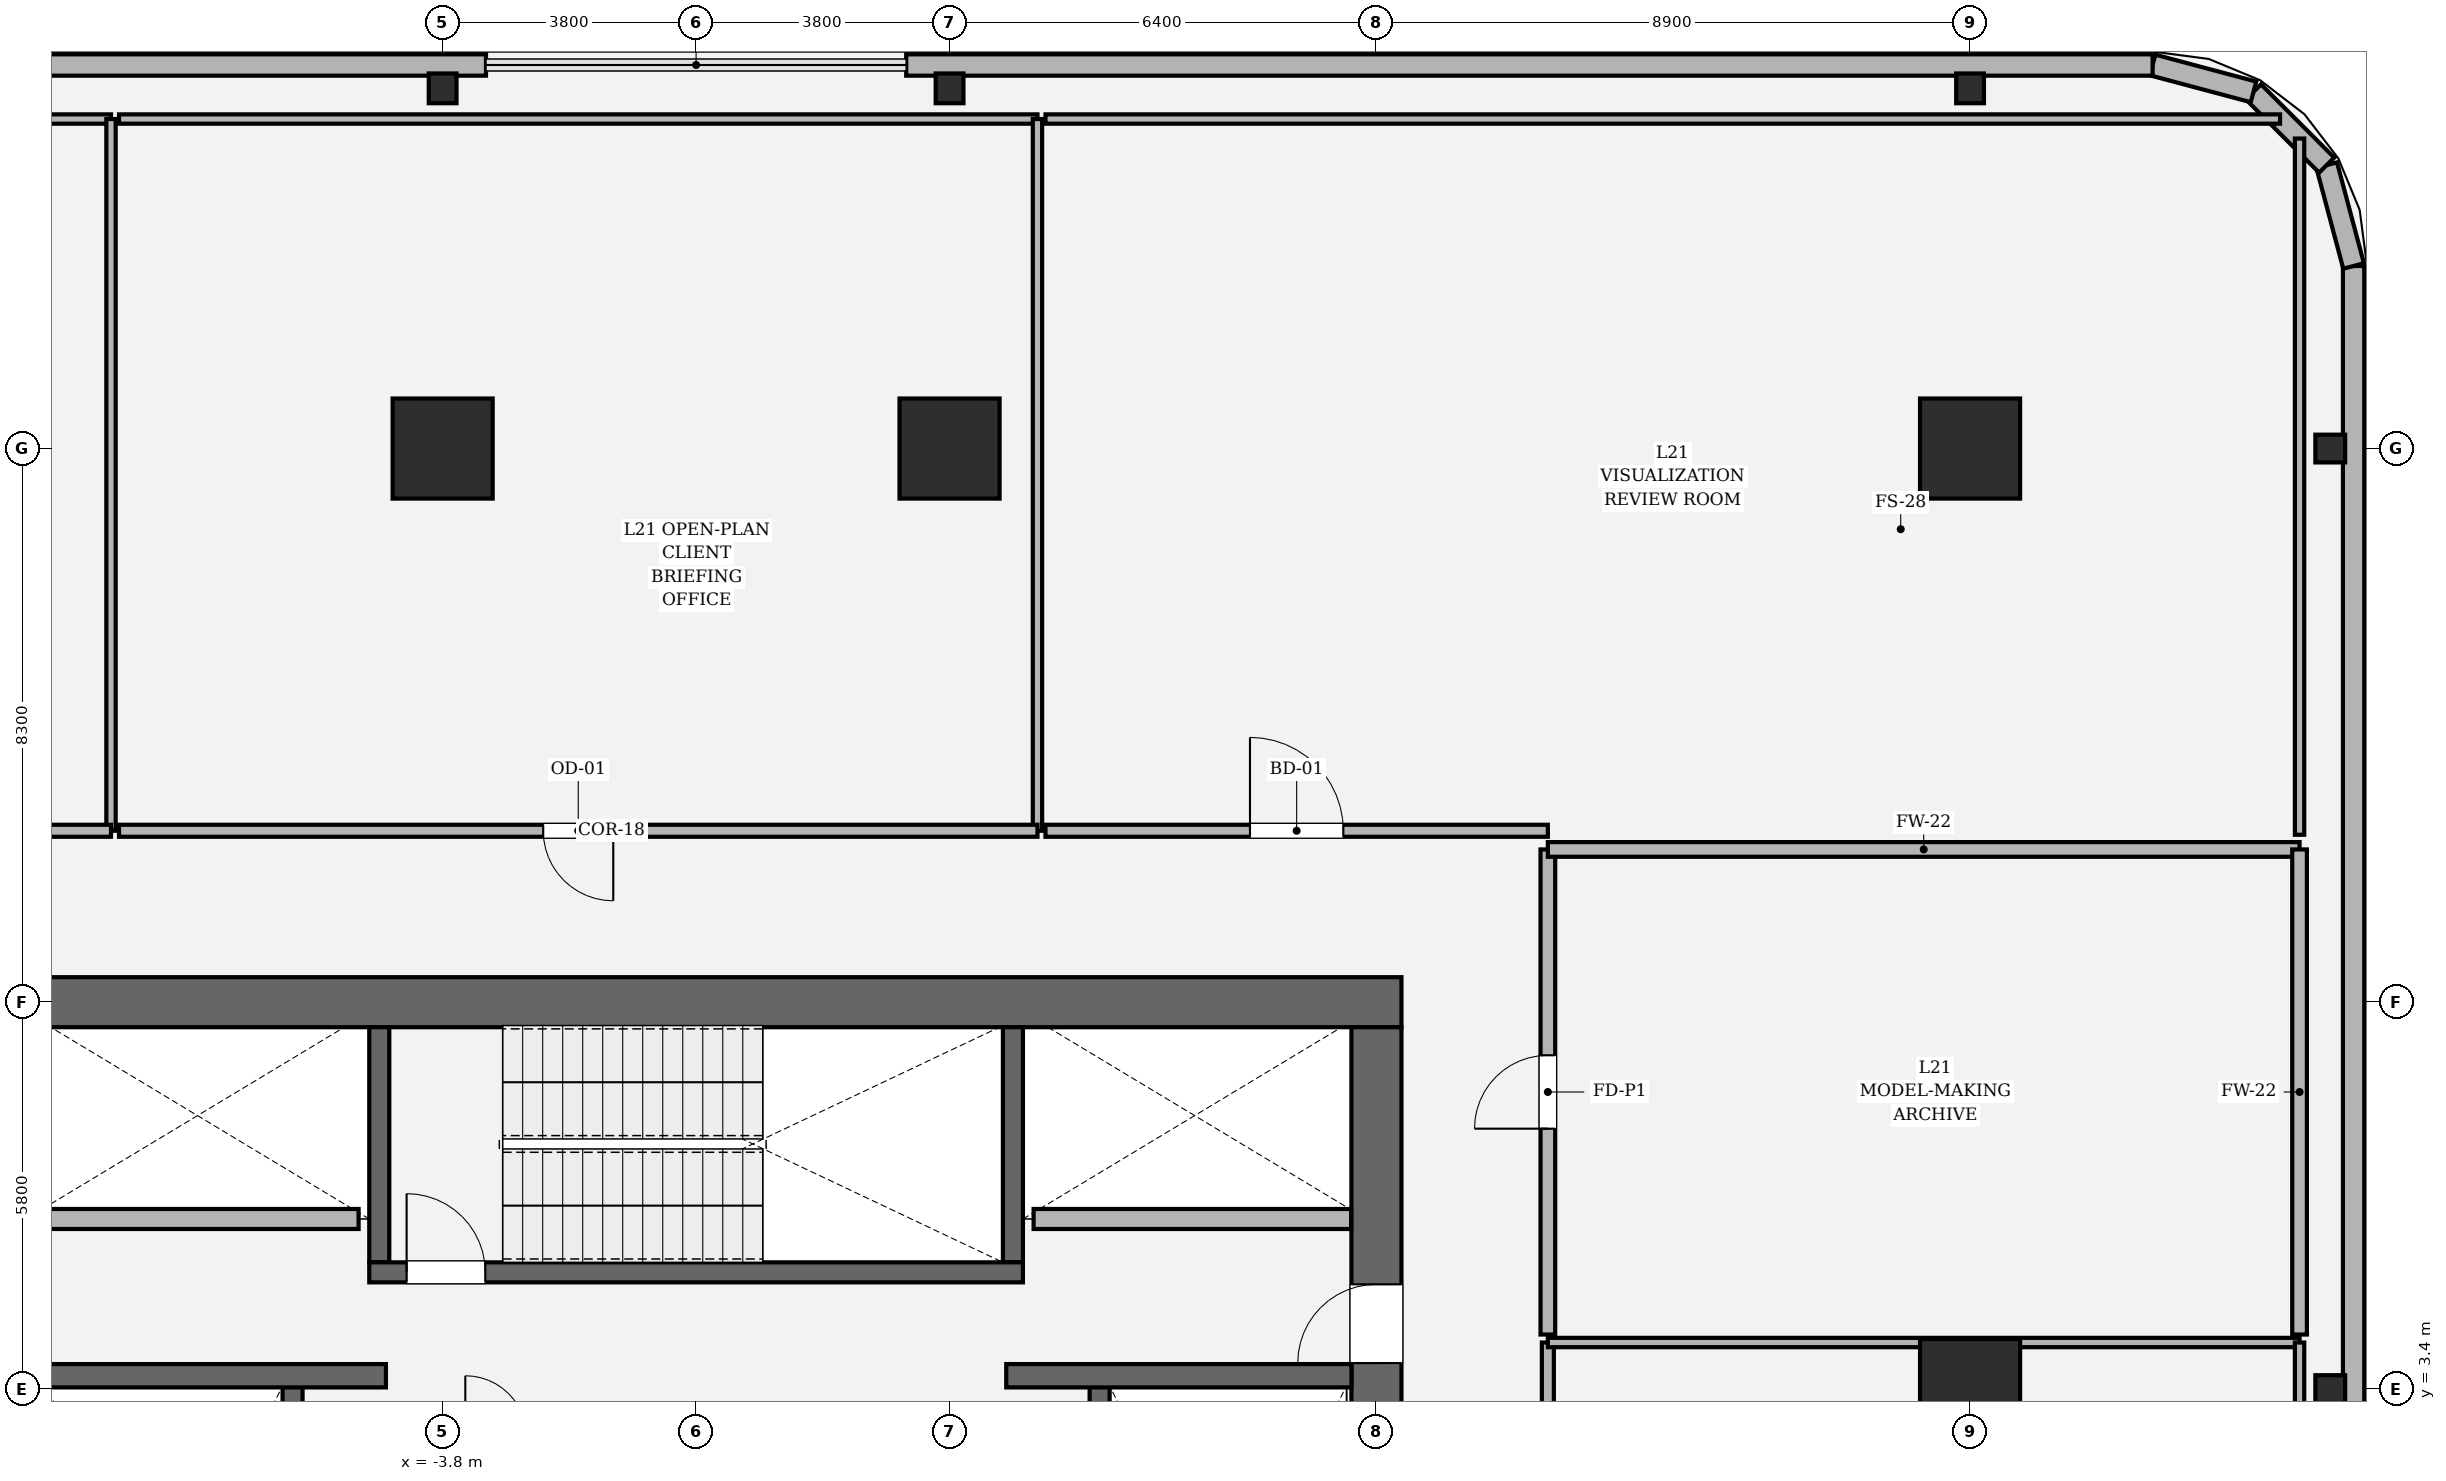
"""IFC4 building model, lengths in metres.
Left out: names, types, materials, properties, quantities, classifications, styles, units other than length and angle.
Written with IfcOpenShell. Run it as: python <this file> out.ifc"""

import sys

from ifc_helpers import new_model, si_unit, direction, frame, frame_2d, origin, origin_2d, place, context, subcontext, project, spatial, rectangle, hollow_rectangle, i_section, extrude, element, fill, save


model = new_model("IFC4")
c1 = context("Model", 3, precision=1e-05, world=origin(), true_north=direction((0.0, 1.0)))
c2 = subcontext(c1, "Body", "Model", "MODEL_VIEW")
j1 = project(units=[si_unit("LENGTHUNIT", "METRE"), si_unit("PLANEANGLEUNIT", "RADIAN")], contexts=[c1])
p1 = place(None, origin())
s1 = spatial("IfcSite", under=j1, at=p1, CompositionType="ELEMENT")
p2 = place(p1, origin())
s2 = spatial("IfcBuilding", under=s1, at=p2, CompositionType="ELEMENT")
p3 = place(p2, frame((0.0, 0.0, 93.0)))
s3 = spatial("IfcBuildingStorey", under=s2, at=p3, CompositionType="ELEMENT", Elevation=93.0)
p4 = place(p3, frame((-10.575, 9.2, 0.0), z_axis=(0.0, 0.0, 1.0), x_axis=(1.0, 0.0, 0.0)))
e1 = element("IfcWall", 1, at=p4, inside=s3, PredefinedType="SHEAR", context=c2, shape_type="SweptSolid", body=[
    extrude(rectangle(XDim=21.15, YDim=0.75, at=frame_2d((10.575, 0.0))), origin(), (0.0, 0.0, 1.0), 4.05),
])
p5 = place(p3, frame((10.2, 8.825, 0.0), z_axis=(0.0, 0.0, 1.0), x_axis=(0.0, -1.0, 0.0)))
e2 = element("IfcWall", 2, at=p5, inside=s3, PredefinedType="SHEAR", context=c2, shape_type="SweptSolid", body=[
    extrude(rectangle(XDim=17.65, YDim=0.75, at=frame_2d((8.825, 0.0))), origin(), (0.0, 0.0, 1.0), 4.05),
])
p6 = place(p5, frame((3.855, 0.0, 0.0)))
e3 = element("IfcOpeningElement", 3, at=p6, cuts=e2, PredefinedType="OPENING", context=c2, shape_type="SweptSolid", body=[
    extrude(rectangle(XDim=1.18, YDim=2.2, at=frame_2d((0.59, 1.1))), frame((0.0, 0.385, 0.0), z_axis=(0.0, -1.0, 0.0), x_axis=(1.0, 0.0, 0.0)), (0.0, 0.0, 1.0), 0.77),
])
for number, where, z_axis, x_axis in (
    (4, (-6.05, -5.5, 0.0), (0.0, 0.0, 1.0), (0.0, 1.0, 0.0)),
    (5, (6.05, 3.45, 0.0), (0.0, 0.0, 1.0), (0.0, -1.0, 0.0)),
):
    element("IfcWall", number, at=place(p3, frame(where, z_axis=z_axis, x_axis=x_axis)), inside=s3, PredefinedType="SOLIDWALL", context=c2, shape_type="SweptSolid", body=[
        extrude(rectangle(XDim=8.95, YDim=0.3, at=frame_2d((4.475, 0.0))), origin(), (0.0, 0.0, 1.0), 4.05),
    ])
for number, where, z_axis, x_axis in (
    (6, (-4.75, 5.3, 0.0), (0.0, 0.0, 1.0), (0.0, 1.0, 0.0)),
    (7, (4.75, 8.825, 0.0), (0.0, 0.0, 1.0), (0.0, -1.0, 0.0)),
):
    element("IfcWall", number, at=place(p3, frame(where, z_axis=z_axis, x_axis=x_axis)), inside=s3, PredefinedType="SOLIDWALL", context=c2, shape_type="SweptSolid", body=[
        extrude(rectangle(XDim=3.525, YDim=0.3, at=frame_2d((1.762, 0.0))), origin(), (0.0, 0.0, 1.0), 4.05),
    ])
p7 = place(p3, frame((-4.9, 5.15, 0.0), z_axis=(0.0, 0.0, 1.0), x_axis=(1.0, 0.0, 0.0)))
e8 = element("IfcWall", 8, at=p7, inside=s3, PredefinedType="SOLIDWALL", context=c2, shape_type="SweptSolid", body=[
    extrude(rectangle(XDim=9.8, YDim=0.3, at=frame_2d((4.9, 0.0))), origin(), (0.0, 0.0, 1.0), 4.05),
])
p8 = place(p7, frame((0.56, 0.0, 0.0)))
e9 = element("IfcOpeningElement", 9, at=p8, cuts=e8, PredefinedType="OPENING", context=c2, shape_type="SweptSolid", body=[
    extrude(rectangle(XDim=1.18, YDim=2.2, at=frame_2d((0.59, 1.1))), frame((0.0, 0.16, 0.0), z_axis=(0.0, -1.0, 0.0), x_axis=(1.0, 0.0, 0.0)), (0.0, 0.0, 1.0), 0.32),
])
for number, where, z_axis, x_axis in (
    (10, (-9.825, 3.6, 0.0), (0.0, 0.0, 1.0), (1.0, 0.0, 0.0)),
    (11, (4.65, 3.6, 0.0), (0.0, 0.0, 1.0), (1.0, 0.0, 0.0)),
):
    element("IfcWall", number, at=place(p3, frame(where, z_axis=z_axis, x_axis=x_axis)), inside=s3, PredefinedType="SOLIDWALL", context=c2, shape_type="SweptSolid", body=[
        extrude(rectangle(XDim=5.175, YDim=0.35, at=frame_2d((2.587, 0.0))), origin(), (0.0, 0.0, 1.0), 4.05),
    ])
for number, where, z_axis, x_axis in (
    (12, (19.1, 3.4, 0.0), (0.0, 0.0, 1.0), (1.0, 0.0, 0.0)),
    (13, (19.1, 17.5, 0.0), (0.0, 0.0, 1.0), (1.0, 0.0, 0.0)),
    (14, (3.8, 17.5, 0.0), (0.0, 0.0, 1.0), (1.0, 0.0, 0.0)),
    (15, (-3.8, 17.5, 0.0), (0.0, 0.0, 1.0), (1.0, 0.0, 0.0)),
):
    element("IfcColumn", number, at=place(p3, frame(where, z_axis=z_axis, x_axis=x_axis)), inside=s3, PredefinedType="COLUMN", context=c2, shape_type="SweptSolid", body=[
        extrude(hollow_rectangle(XDim=1.5, YDim=1.5, WallThickness=0.045, at=origin_2d()), origin(), (0.0, 0.0, 1.0), 4.05),
    ])
for number, where, z_axis, x_axis in (
    (16, (-3.8, 22.9, 0.0), (0.0, 0.0, 1.0), (1.0, 0.0, 0.0)),
    (17, (3.8, 22.9, 0.0), (0.0, 0.0, 1.0), (1.0, 0.0, 0.0)),
    (18, (19.1, 22.9, 0.0), (0.0, 0.0, 1.0), (1.0, 0.0, 0.0)),
    (19, (24.5, 3.4, 0.0), (0.0, 0.0, 1.0), (0.0, 1.0, 0.0)),
    (20, (24.5, 17.5, 0.0), (0.0, 0.0, 1.0), (0.0, 1.0, 0.0)),
):
    element("IfcColumn", number, at=place(p3, frame(where, z_axis=z_axis, x_axis=x_axis)), inside=s3, PredefinedType="COLUMN", context=c2, shape_type="SweptSolid", body=[
        extrude(i_section(OverallWidth=0.416, OverallDepth=0.446, WebThickness=0.039, FlangeThickness=0.062, FilletRadius=0.018, at=origin_2d()), origin(), (0.0, 0.0, 1.0), 4.048),
    ])
p9 = place(p3, frame((24.85, 2.75, 0.0), z_axis=(0.0, 0.0, 1.0), x_axis=(0.0, 1.0, 0.0)))
e21 = element("IfcWall", 21, at=p9, inside=s3, PredefinedType="SOLIDWALL", context=c2, shape_type="SweptSolid", body=[
    extrude(rectangle(XDim=17.487, YDim=0.32, at=frame_2d((8.743, 0.0))), origin(), (0.0, 0.0, 1.0), 2.524),
])
p10 = place(p3, frame((24.85, 20.237, 0.0), z_axis=(0.0, 0.0, 1.0), x_axis=(-0.257847112249, 0.966185730957, 0.0)))
e22 = element("IfcWall", 22, at=p10, inside=s3, PredefinedType="SOLIDWALL", context=c2, shape_type="SweptSolid", body=[
    extrude(rectangle(XDim=1.565, YDim=0.32, at=frame_2d((0.783, 0.0))), origin(), (0.0, 0.0, 1.0), 3.81),
])
p11 = place(p3, frame((24.447, 21.749, 0.0), z_axis=(0.0, 0.0, 1.0), x_axis=(-0.707028130747, 0.707185422879, 0.0)))
e23 = element("IfcWall", 23, at=p11, inside=s3, PredefinedType="SOLIDWALL", context=c2, shape_type="SweptSolid", body=[
    extrude(rectangle(XDim=1.552, YDim=0.32, at=frame_2d((0.776, 0.0))), origin(), (0.0, 0.0, 1.0), 3.81),
])
p12 = place(p3, frame((23.349, 22.847, 0.0), z_axis=(0.0, 0.0, 1.0), x_axis=(-0.966224582397, 0.257701486942, 0.0)))
e24 = element("IfcWall", 24, at=p12, inside=s3, PredefinedType="SOLIDWALL", context=c2, shape_type="SweptSolid", body=[
    extrude(rectangle(XDim=1.565, YDim=0.32, at=frame_2d((0.783, 0.0))), origin(), (0.0, 0.0, 1.0), 3.81),
])
p13 = place(p3, frame((21.837, 23.25, 0.0), z_axis=(0.0, 0.0, 1.0), x_axis=(-1.0, 0.0, 0.0)))
e25 = element("IfcWall", 25, at=p13, inside=s3, PredefinedType="SOLIDWALL", context=c2, shape_type="SweptSolid", body=[
    extrude(rectangle(XDim=18.687, YDim=0.32, at=frame_2d((9.344, 0.0))), origin(), (0.0, 0.0, 1.0), 2.524),
])
p14 = place(p3, frame((-3.15, 23.25, 0.0), z_axis=(0.0, 0.0, 1.0), x_axis=(-1.0, 0.0, 0.0)))
e26 = element("IfcWall", 26, at=p14, inside=s3, PredefinedType="SOLIDWALL", context=c2, shape_type="SweptSolid", body=[
    extrude(rectangle(XDim=13.887, YDim=0.32, at=frame_2d((6.943, 0.0))), origin(), (0.0, 0.0, 1.0), 2.524),
])
for number, where, z_axis, x_axis in (
    (27, (-9.82, 5.95, 0.0), (0.0, 0.0, 1.0), (1.0, 0.0, 0.0)),
    (28, (5.06, 5.95, 0.0), (0.0, 0.0, 1.0), (1.0, 0.0, 0.0)),
):
    element("IfcWall", number, at=place(p3, frame(where, z_axis=z_axis, x_axis=x_axis)), inside=s3, PredefinedType="SOLIDWALL", context=c2, shape_type="SweptSolid", body=[
        extrude(rectangle(XDim=4.76, YDim=0.3, at=frame_2d((2.38, 0.0))), origin(), (0.0, 0.0, 1.0), 3.81),
    ])
p15 = place(p3, frame((12.77, -2.712, 0.0), z_axis=(0.0, 0.0, 1.0), x_axis=(0.0, 1.0, 0.0)))
e29 = element("IfcWall", 29, at=p15, inside=s3, PredefinedType="PARTITIONING", context=c2, shape_type="SweptSolid", body=[
    extrude(rectangle(XDim=6.81, YDim=0.18, at=frame_2d((3.405, 0.0))), origin(), (0.0, 0.0, 1.0), 3.104),
])
p16 = place(p15, frame((2.88, 0.0, 0.0)))
e30 = element("IfcOpeningElement", 30, at=p16, cuts=e29, PredefinedType="OPENING", context=c2, shape_type="SweptSolid", body=[
    extrude(rectangle(XDim=1.05, YDim=2.2, at=frame_2d((0.525, 1.1))), frame((0.0, 0.1, 0.0), z_axis=(0.0, -1.0, 0.0), x_axis=(1.0, 0.0, 0.0)), (0.0, 0.0, 1.0), 0.2),
])
p17 = place(p3, frame((12.77, 4.098, 0.0), z_axis=(0.0, 0.0, 1.0), x_axis=(1.0, 0.0, 0.0)))
e31 = element("IfcWall", 31, at=p17, inside=s3, PredefinedType="PARTITIONING", context=c2, shape_type="SweptSolid", body=[
    extrude(rectangle(XDim=11.27, YDim=0.14, at=frame_2d((5.635, 0.0))), origin(), (0.0, 0.0, 1.0), 3.104),
])
p18 = place(p3, frame((24.04, 4.098, 0.0), z_axis=(0.0, 0.0, 1.0), x_axis=(0.0, -1.0, 0.0)))
e32 = element("IfcWall", 32, at=p18, inside=s3, PredefinedType="PARTITIONING", context=c2, shape_type="SweptSolid", body=[
    extrude(rectangle(XDim=6.81, YDim=0.14, at=frame_2d((3.405, 0.0))), origin(), (0.0, 0.0, 1.0), 2.484),
])
p19 = place(p3, frame((12.77, 4.218, 0.0), z_axis=(0.0, 0.0, 1.0), x_axis=(0.0, 1.0, 0.0)))
e33 = element("IfcWall", 33, at=p19, inside=s3, PredefinedType="SOLIDWALL", context=c2, shape_type="SweptSolid", body=[
    extrude(rectangle(XDim=7.272, YDim=0.22, at=frame_2d((3.636, 0.0))), origin(), (0.0, 0.0, 1.0), 3.104),
])
p20 = place(p19, frame((3.086, 0.0, 0.0)))
e34 = element("IfcOpeningElement", 34, at=p20, cuts=e33, PredefinedType="OPENING", context=c2, shape_type="SweptSolid", body=[
    extrude(rectangle(XDim=1.1, YDim=2.2, at=frame_2d((0.55, 1.1))), frame((0.0, 0.12, 0.0), z_axis=(0.0, -1.0, 0.0), x_axis=(1.0, 0.0, 0.0)), (0.0, 0.0, 1.0), 0.24),
])
p21 = place(p3, frame((12.77, 11.49, 0.0), z_axis=(0.0, 0.0, 1.0), x_axis=(1.0, 0.0, 0.0)))
e35 = element("IfcWall", 35, at=p21, inside=s3, PredefinedType="SOLIDWALL", context=c2, shape_type="SweptSolid", body=[
    extrude(rectangle(XDim=11.27, YDim=0.22, at=frame_2d((5.635, 0.0))), origin(), (0.0, 0.0, 1.0), 3.104),
])
p22 = place(p3, frame((24.04, 11.49, 0.0), z_axis=(0.0, 0.0, 1.0), x_axis=(0.0, -1.0, 0.0)))
e36 = element("IfcWall", 36, at=p22, inside=s3, PredefinedType="SOLIDWALL", context=c2, shape_type="SweptSolid", body=[
    extrude(rectangle(XDim=7.272, YDim=0.22, at=frame_2d((3.636, 0.0))), origin(), (0.0, 0.0, 1.0), 3.81),
])
p23 = place(p3, frame((-18.14, 22.44, 0.0), z_axis=(0.0, 0.0, 1.0), x_axis=(1.0, 0.0, 0.0)))
e37 = element("IfcWall", 37, at=p23, inside=s3, PredefinedType="PARTITIONING", context=c2, shape_type="SweptSolid", body=[
    extrude(rectangle(XDim=9.368, YDim=0.14, at=frame_2d((4.684, 0.0))), origin(), (0.0, 0.0, 1.0), 3.81),
])
p24 = place(p3, frame((-8.772, 22.44, 0.0), z_axis=(0.0, 0.0, 1.0), x_axis=(0.0, -1.0, 0.0)))
e38 = element("IfcWall", 38, at=p24, inside=s3, PredefinedType="PARTITIONING", context=c2, shape_type="SweptSolid", body=[
    extrude(rectangle(XDim=10.67, YDim=0.14, at=frame_2d((5.335, 0.0))), origin(), (0.0, 0.0, 1.0), 3.104),
])
p25 = place(p3, frame((-8.772, 11.77, 0.0), z_axis=(0.0, 0.0, 1.0), x_axis=(-1.0, 0.0, 0.0)))
e39 = element("IfcWall", 39, at=p25, inside=s3, PredefinedType="PARTITIONING", context=c2, shape_type="SweptSolid", body=[
    extrude(rectangle(XDim=3.998, YDim=0.18, at=frame_2d((1.999, 0.0))), origin(), (0.0, 0.0, 1.0), 3.104),
])
p26 = place(p25, frame((1.299, 0.0, 0.0)))
e40 = element("IfcOpeningElement", 40, at=p26, cuts=e39, PredefinedType="OPENING", context=c2, shape_type="SweptSolid", body=[
    extrude(rectangle(XDim=1.4, YDim=2.25, at=frame_2d((0.7, 1.125))), frame((0.0, 0.1, 0.0), z_axis=(0.0, -1.0, 0.0), x_axis=(1.0, 0.0, 0.0)), (0.0, 0.0, 1.0), 0.2),
])
p27 = place(p3, frame((-8.652, 22.44, 0.0), z_axis=(0.0, 0.0, 1.0), x_axis=(1.0, 0.0, 0.0)))
e41 = element("IfcWall", 41, at=p27, inside=s3, PredefinedType="PARTITIONING", context=c2, shape_type="SweptSolid", body=[
    extrude(rectangle(XDim=13.77, YDim=0.14, at=frame_2d((6.885, 0.0))), origin(), (0.0, 0.0, 1.0), 2.484),
])
p28 = place(p3, frame((5.118, 22.44, 0.0), z_axis=(0.0, 0.0, 1.0), x_axis=(0.0, -1.0, 0.0)))
e42 = element("IfcWall", 42, at=p28, inside=s3, PredefinedType="PARTITIONING", context=c2, shape_type="SweptSolid", body=[
    extrude(rectangle(XDim=10.67, YDim=0.14, at=frame_2d((5.335, 0.0))), origin(), (0.0, 0.0, 1.0), 3.104),
])
p29 = place(p3, frame((5.118, 11.77, 0.0), z_axis=(0.0, 0.0, 1.0), x_axis=(-1.0, 0.0, 0.0)))
e43 = element("IfcWall", 43, at=p29, inside=s3, PredefinedType="PARTITIONING", context=c2, shape_type="SweptSolid", body=[
    extrude(rectangle(XDim=13.77, YDim=0.18, at=frame_2d((6.885, 0.0))), origin(), (0.0, 0.0, 1.0), 3.104),
])
p30 = place(p29, frame((6.36, 0.0, 0.0)))
e44 = element("IfcOpeningElement", 44, at=p30, cuts=e43, PredefinedType="OPENING", context=c2, shape_type="SweptSolid", body=[
    extrude(rectangle(XDim=1.05, YDim=2.2, at=frame_2d((0.525, 1.1))), frame((0.0, 0.1, 0.0), z_axis=(0.0, -1.0, 0.0), x_axis=(1.0, 0.0, 0.0)), (0.0, 0.0, 1.0), 0.2),
])
p31 = place(p3, frame((5.238, 22.44, 0.0), z_axis=(0.0, 0.0, 1.0), x_axis=(1.0, 0.0, 0.0)))
e45 = element("IfcWall", 45, at=p31, inside=s3, PredefinedType="PARTITIONING", context=c2, shape_type="SweptSolid", body=[
    extrude(rectangle(XDim=18.51, YDim=0.14, at=frame_2d((9.255, 0.0))), origin(), (0.0, 0.0, 1.0), 2.484),
])
p32 = place(p3, frame((24.04, 22.147, 0.0), z_axis=(0.0, 0.0, 1.0), x_axis=(0.0, -1.0, 0.0)))
e46 = element("IfcWall", 46, at=p32, inside=s3, PredefinedType="PARTITIONING", context=c2, shape_type="SweptSolid", body=[
    extrude(rectangle(XDim=10.438, YDim=0.14, at=frame_2d((5.219, 0.0))), origin(), (0.0, 0.0, 1.0), 2.484),
])
p33 = place(p3, frame((12.77, 11.77, 0.0), z_axis=(0.0, 0.0, 1.0), x_axis=(-1.0, 0.0, 0.0)))
e47 = element("IfcWall", 47, at=p33, inside=s3, PredefinedType="PARTITIONING", context=c2, shape_type="SweptSolid", body=[
    extrude(rectangle(XDim=7.532, YDim=0.18, at=frame_2d((3.766, 0.0))), origin(), (0.0, 0.0, 1.0), 3.104),
])
p34 = place(p33, frame((3.066, 0.0, 0.0)))
e48 = element("IfcOpeningElement", 48, at=p34, cuts=e47, PredefinedType="OPENING", context=c2, shape_type="SweptSolid", body=[
    extrude(rectangle(XDim=1.4, YDim=2.25, at=frame_2d((0.7, 1.125))), frame((0.0, 0.1, 0.0), z_axis=(0.0, -1.0, 0.0), x_axis=(1.0, 0.0, 0.0)), (0.0, 0.0, 1.0), 0.2),
])
p35 = place(p8, origin())
e49 = element("IfcDoor", 49, at=p35, inside=s3, OperationType="SINGLE_SWING_LEFT", PredefinedType="DOOR", context=c2, shape_type="SweptSolid", body=[
    extrude(rectangle(XDim=1.18, YDim=2.2, at=frame_2d((0.59, 1.1))), frame((0.0, 0.025, 0.0), z_axis=(0.0, -1.0, 0.0), x_axis=(1.0, 0.0, 0.0)), (0.0, 0.0, 1.0), 0.05),
])
fill(e9, e49)
p36 = place(p6, origin())
e50 = element("IfcDoor", 50, at=p36, inside=s3, OperationType="SINGLE_SWING_RIGHT", PredefinedType="DOOR", context=c2, shape_type="SweptSolid", body=[
    extrude(rectangle(XDim=1.18, YDim=2.2, at=frame_2d((0.59, 1.1))), frame((0.0, 0.025, 0.0), z_axis=(0.0, -1.0, 0.0), x_axis=(1.0, 0.0, 0.0)), (0.0, 0.0, 1.0), 0.05),
])
fill(e3, e50)
p37 = place(p20, origin())
e51 = element("IfcDoor", 51, at=p37, inside=s3, OperationType="SINGLE_SWING_LEFT", PredefinedType="DOOR", context=c2, shape_type="SweptSolid", body=[
    extrude(rectangle(XDim=1.1, YDim=2.2, at=frame_2d((0.55, 1.1))), frame((0.0, 0.025, 0.0), z_axis=(0.0, -1.0, 0.0), x_axis=(1.0, 0.0, 0.0)), (0.0, 0.0, 1.0), 0.05),
])
fill(e34, e51)
p38 = place(p30, origin())
e52 = element("IfcDoor", 52, at=p38, inside=s3, OperationType="SINGLE_SWING_LEFT", PredefinedType="DOOR", context=c2, shape_type="SweptSolid", body=[
    extrude(rectangle(XDim=1.05, YDim=2.2, at=frame_2d((0.525, 1.1))), frame((0.0, 0.025, 0.0), z_axis=(0.0, -1.0, 0.0), x_axis=(1.0, 0.0, 0.0)), (0.0, 0.0, 1.0), 0.05),
])
fill(e44, e52)
p39 = place(p34, origin())
e53 = element("IfcDoor", 53, at=p39, inside=s3, OperationType="SINGLE_SWING_RIGHT", PredefinedType="DOOR", context=c2, shape_type="SweptSolid", body=[
    extrude(rectangle(XDim=1.4, YDim=2.25, at=frame_2d((0.7, 1.125))), frame((0.0, 0.025, 0.0), z_axis=(0.0, -1.0, 0.0), x_axis=(1.0, 0.0, 0.0)), (0.0, 0.0, 1.0), 0.05),
])
fill(e48, e53)
save(model, sys.argv[1])
